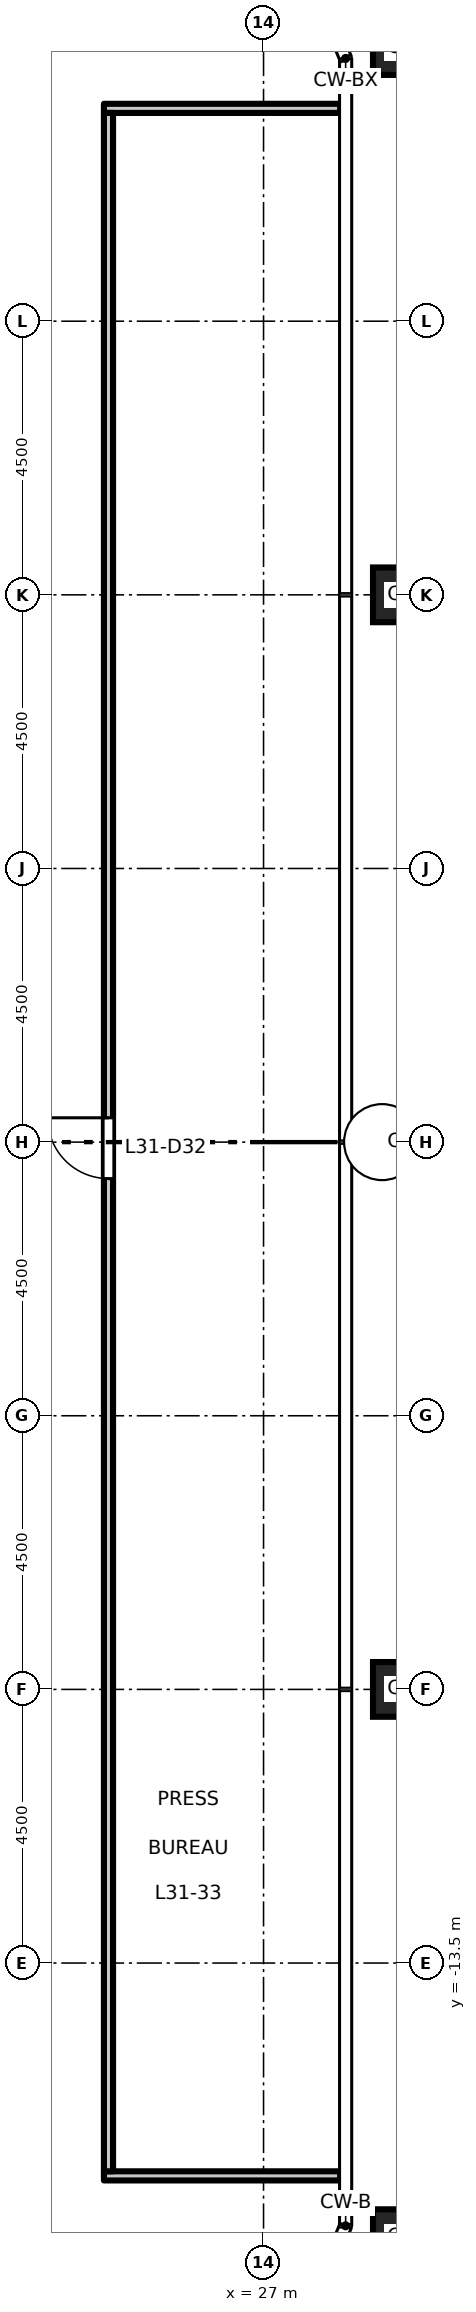
"""IFC4 building model, lengths in metres.
Left out: names, types, materials, properties, quantities, classifications, styles, units other than length and angle.
Written with IfcOpenShell. Run it as: python <this file> out.ifc"""

import sys

from ifc_helpers import new_model, si_unit, direction, frame, frame_2d, origin, origin_2d, place, context, subcontext, project, spatial, rectangle, hollow_rectangle, extrude, element, fill, save


model = new_model("IFC4")
c1 = context("Model", 3, precision=1e-05, world=origin(), true_north=direction((0.0, 1.0)))
c2 = subcontext(c1, "Body", "Model", "MODEL_VIEW")
j1 = project(units=[si_unit("LENGTHUNIT", "METRE"), si_unit("PLANEANGLEUNIT", "RADIAN")], contexts=[c1])
p1 = place(None, origin())
s1 = spatial("IfcSite", under=j1, at=p1, CompositionType="ELEMENT")
p2 = place(p1, origin())
s2 = spatial("IfcBuilding", under=s1, at=p2, CompositionType="ELEMENT")
p3 = place(p2, frame((0.0, 0.0, 145.2)))
s3 = spatial("IfcBuildingStorey", under=s2, at=p3, CompositionType="ELEMENT", Elevation=145.2)
for number, where, z_axis, x_axis in (
    (1, (29.25, -18.0, 0.0), (0.0, 0.0, 1.0), (1.0, 0.0, 0.0)),
    (2, (29.25, -9.0, 0.0), (0.0, 0.0, 1.0), (1.0, 0.0, 0.0)),
    (3, (29.25, 0.0, 0.0), (0.0, 0.0, 1.0), (1.0, 0.0, 0.0)),
    (4, (29.25, 9.0, 0.0), (0.0, 0.0, 1.0), (1.0, 0.0, 0.0)),
    (5, (29.25, 18.0, 0.0), (0.0, 0.0, 1.0), (1.0, 0.0, 0.0)),
):
    element("IfcColumn", number, at=place(p3, frame(where, z_axis=z_axis, x_axis=x_axis)), inside=s3, PredefinedType="COLUMN", context=c2, shape_type="SweptSolid", body=[
        extrude(hollow_rectangle(XDim=0.9, YDim=0.9, WallThickness=0.05, at=origin_2d()), origin(), (0.0, 0.0, 1.0), 4.5),
    ])
for number, where, z_axis, x_axis in (
    (6, (24.375, -17.0, 0.0), (0.0, 0.0, 1.0), (1.0, 0.0, 0.0)),
    (7, (24.375, 17.0, 0.0), (0.0, 0.0, 1.0), (1.0, 0.0, 0.0)),
):
    element("IfcWall", number, at=place(p3, frame(where, z_axis=z_axis, x_axis=x_axis)), inside=s3, PredefinedType="PARTITIONING", context=c2, shape_type="SweptSolid", body=[
        extrude(rectangle(XDim=3.885, YDim=0.15, at=frame_2d((1.942, 0.0))), origin(), (0.0, 0.0, 1.0), 4.35),
    ])
p4 = place(p3, frame((24.45, -16.925, 0.0), z_axis=(0.0, 0.0, 1.0), x_axis=(0.0, 1.0, 0.0)))
e8 = element("IfcWall", 8, at=p4, inside=s3, PredefinedType="PARTITIONING", context=c2, shape_type="SweptSolid", body=[
    extrude(rectangle(XDim=33.85, YDim=0.15, at=frame_2d((16.925, 0.0))), origin(), (0.0, 0.0, 1.0), 4.35),
])
p5 = place(p4, frame((16.325, 0.0, 0.0)))
e9 = element("IfcOpeningElement", 9, at=p5, cuts=e8, PredefinedType="OPENING", context=c2, shape_type="SweptSolid", body=[
    extrude(rectangle(XDim=1.0, YDim=2.1, at=frame_2d((0.5, 1.05))), frame((0.0, 0.085, 0.0), z_axis=(0.0, -1.0, 0.0), x_axis=(1.0, 0.0, 0.0)), (0.0, 0.0, 1.0), 0.17),
])
p6 = place(p5, origin())
e10 = element("IfcDoor", 10, at=p6, inside=s3, OperationType="SINGLE_SWING_RIGHT", PredefinedType="DOOR", context=c2, shape_type="SweptSolid", body=[
    extrude(rectangle(XDim=1.0, YDim=2.1, at=frame_2d((0.5, 1.05))), frame((0.0, 0.025, 0.0), z_axis=(0.0, -1.0, 0.0), x_axis=(1.0, 0.0, 0.0)), (0.0, 0.0, 1.0), 0.05),
])
fill(e9, e10)
save(model, sys.argv[1])
